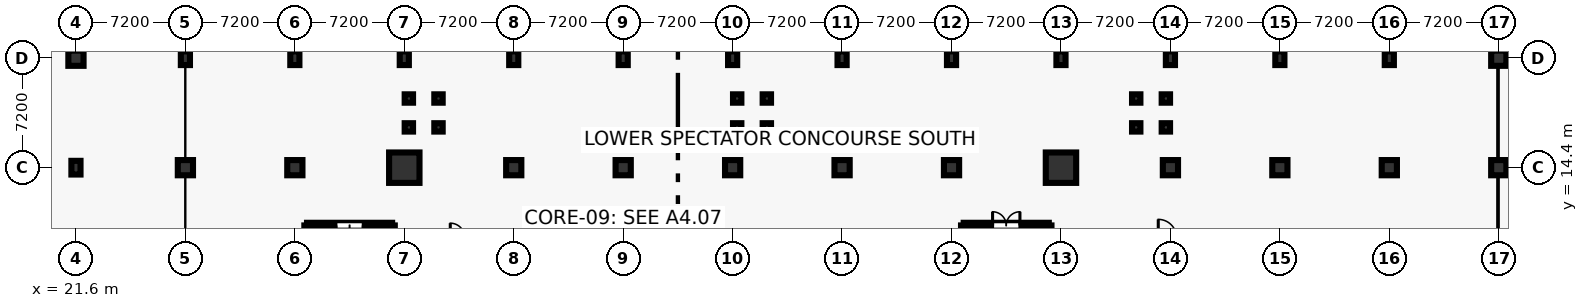
"""IFC4 building model, lengths in metres.
Left out: names, types, materials, properties, quantities, classifications, styles, units other than length and angle.
Written with IfcOpenShell. Run it as: python <this file> out.ifc"""

import sys

from ifc_helpers import new_model, si_unit, direction, frame, frame_2d, origin, origin_2d, place, context, subcontext, project, spatial, rectangle, circle, extrude, element, fill, save


model = new_model("IFC4")
c1 = context("Model", 3, precision=1e-05, world=origin(), true_north=direction((0.0, 1.0)))
c2 = subcontext(c1, "Body", "Model", "MODEL_VIEW")
j1 = project(units=[si_unit("LENGTHUNIT", "METRE"), si_unit("PLANEANGLEUNIT", "RADIAN")], contexts=[c1])
p1 = place(None, origin())
s1 = spatial("IfcSite", under=j1, at=p1, CompositionType="ELEMENT")
p2 = place(p1, origin())
s2 = spatial("IfcBuilding", under=s1, at=p2, CompositionType="ELEMENT")
p3 = place(p2, origin())
s3 = spatial("IfcBuildingStorey", under=s2, at=p3, CompositionType="ELEMENT", Elevation=0.0)
p4 = place(p3, frame((21.6, 14.4, 0.0), z_axis=(0.0, 0.0, 1.0), x_axis=(1.0, 0.0, 0.0)))
e1 = element("IfcColumn", 1, at=p4, inside=s3, PredefinedType="COLUMN", context=c2, shape_type="SweptSolid", body=[
    extrude(rectangle(XDim=0.6, YDim=0.9, at=origin_2d()), origin(), (0.0, 0.0, 1.0), 5.4),
])
p5 = place(p3, frame((21.6, 21.6, 0.0), z_axis=(0.0, 0.0, 1.0), x_axis=(1.0, 0.0, 0.0)))
e2 = element("IfcColumn", 2, at=p5, inside=s3, PredefinedType="COLUMN", context=c2, shape_type="SweptSolid", body=[
    extrude(rectangle(XDim=1.0, YDim=1.0, at=origin_2d()), origin(), (0.0, 0.0, 1.0), 5.4),
])
p6 = place(p3, frame((28.8, 14.4, 0.0), z_axis=(0.0, 0.0, 1.0), x_axis=(1.0, 0.0, 0.0)))
e3 = element("IfcColumn", 3, at=p6, inside=s3, PredefinedType="COLUMN", context=c2, shape_type="SweptSolid", body=[
    extrude(circle(Radius=0.5, at=origin_2d()), origin(), (0.0, 0.0, 1.0), 5.4),
])
p7 = place(p3, frame((28.8, 21.6, 0.0), z_axis=(0.0, 0.0, 1.0), x_axis=(1.0, 0.0, 0.0)))
e4 = element("IfcColumn", 4, at=p7, inside=s3, PredefinedType="COLUMN", context=c2, shape_type="SweptSolid", body=[
    extrude(rectangle(XDim=0.6, YDim=0.9, at=origin_2d()), origin(), (0.0, 0.0, 1.0), 5.4),
])
p8 = place(p3, frame((36.0, 14.4, 0.0), z_axis=(0.0, 0.0, 1.0), x_axis=(1.0, 0.0, 0.0)))
e5 = element("IfcColumn", 5, at=p8, inside=s3, PredefinedType="COLUMN", context=c2, shape_type="SweptSolid", body=[
    extrude(circle(Radius=0.5, at=origin_2d()), origin(), (0.0, 0.0, 1.0), 5.4),
])
p9 = place(p3, frame((36.0, 21.6, 0.0), z_axis=(0.0, 0.0, 1.0), x_axis=(1.0, 0.0, 0.0)))
e6 = element("IfcColumn", 6, at=p9, inside=s3, PredefinedType="COLUMN", context=c2, shape_type="SweptSolid", body=[
    extrude(rectangle(XDim=0.6, YDim=0.9, at=origin_2d()), origin(), (0.0, 0.0, 1.0), 5.4),
])
p10 = place(p3, frame((43.2, 14.4, 0.0), z_axis=(0.0, 0.0, 1.0), x_axis=(1.0, 0.0, 0.0)))
e7 = element("IfcColumn", 7, at=p10, inside=s3, PredefinedType="COLUMN", context=c2, shape_type="SweptSolid", body=[
    extrude(circle(Radius=1.0, at=origin_2d()), origin(), (0.0, 0.0, 1.0), 5.4),
])
p11 = place(p3, frame((43.2, 21.6, 0.0), z_axis=(0.0, 0.0, 1.0), x_axis=(1.0, 0.0, 0.0)))
e8 = element("IfcColumn", 8, at=p11, inside=s3, PredefinedType="COLUMN", context=c2, shape_type="SweptSolid", body=[
    extrude(rectangle(XDim=0.6, YDim=0.9, at=origin_2d()), origin(), (0.0, 0.0, 1.0), 5.4),
])
p12 = place(p3, frame((50.4, 14.4, 0.0), z_axis=(0.0, 0.0, 1.0), x_axis=(1.0, 0.0, 0.0)))
e9 = element("IfcColumn", 9, at=p12, inside=s3, PredefinedType="COLUMN", context=c2, shape_type="SweptSolid", body=[
    extrude(circle(Radius=0.5, at=origin_2d()), origin(), (0.0, 0.0, 1.0), 5.4),
])
p13 = place(p3, frame((50.4, 21.6, 0.0), z_axis=(0.0, 0.0, 1.0), x_axis=(1.0, 0.0, 0.0)))
e10 = element("IfcColumn", 10, at=p13, inside=s3, PredefinedType="COLUMN", context=c2, shape_type="SweptSolid", body=[
    extrude(rectangle(XDim=0.6, YDim=0.9, at=origin_2d()), origin(), (0.0, 0.0, 1.0), 5.4),
])
p14 = place(p3, frame((57.6, 14.4, 0.0), z_axis=(0.0, 0.0, 1.0), x_axis=(1.0, 0.0, 0.0)))
e11 = element("IfcColumn", 11, at=p14, inside=s3, PredefinedType="COLUMN", context=c2, shape_type="SweptSolid", body=[
    extrude(circle(Radius=0.5, at=origin_2d()), origin(), (0.0, 0.0, 1.0), 5.4),
])
p15 = place(p3, frame((57.6, 21.6, 0.0), z_axis=(0.0, 0.0, 1.0), x_axis=(1.0, 0.0, 0.0)))
e12 = element("IfcColumn", 12, at=p15, inside=s3, PredefinedType="COLUMN", context=c2, shape_type="SweptSolid", body=[
    extrude(rectangle(XDim=0.6, YDim=0.9, at=origin_2d()), origin(), (0.0, 0.0, 1.0), 5.4),
])
p16 = place(p3, frame((64.8, 14.4, 0.0), z_axis=(0.0, 0.0, 1.0), x_axis=(1.0, 0.0, 0.0)))
e13 = element("IfcColumn", 13, at=p16, inside=s3, PredefinedType="COLUMN", context=c2, shape_type="SweptSolid", body=[
    extrude(circle(Radius=0.5, at=origin_2d()), origin(), (0.0, 0.0, 1.0), 5.4),
])
p17 = place(p3, frame((64.8, 21.6, 0.0), z_axis=(0.0, 0.0, 1.0), x_axis=(1.0, 0.0, 0.0)))
e14 = element("IfcColumn", 14, at=p17, inside=s3, PredefinedType="COLUMN", context=c2, shape_type="SweptSolid", body=[
    extrude(rectangle(XDim=0.6, YDim=0.9, at=origin_2d()), origin(), (0.0, 0.0, 1.0), 5.4),
])
p18 = place(p3, frame((72.0, 14.4, 0.0), z_axis=(0.0, 0.0, 1.0), x_axis=(1.0, 0.0, 0.0)))
e15 = element("IfcColumn", 15, at=p18, inside=s3, PredefinedType="COLUMN", context=c2, shape_type="SweptSolid", body=[
    extrude(circle(Radius=0.5, at=origin_2d()), origin(), (0.0, 0.0, 1.0), 5.4),
])
p19 = place(p3, frame((72.0, 21.6, 0.0), z_axis=(0.0, 0.0, 1.0), x_axis=(1.0, 0.0, 0.0)))
e16 = element("IfcColumn", 16, at=p19, inside=s3, PredefinedType="COLUMN", context=c2, shape_type="SweptSolid", body=[
    extrude(rectangle(XDim=0.6, YDim=0.9, at=origin_2d()), origin(), (0.0, 0.0, 1.0), 5.4),
])
p20 = place(p3, frame((79.2, 14.4, 0.0), z_axis=(0.0, 0.0, 1.0), x_axis=(1.0, 0.0, 0.0)))
e17 = element("IfcColumn", 17, at=p20, inside=s3, PredefinedType="COLUMN", context=c2, shape_type="SweptSolid", body=[
    extrude(circle(Radius=0.5, at=origin_2d()), origin(), (0.0, 0.0, 1.0), 5.4),
])
p21 = place(p3, frame((79.2, 21.6, 0.0), z_axis=(0.0, 0.0, 1.0), x_axis=(1.0, 0.0, 0.0)))
e18 = element("IfcColumn", 18, at=p21, inside=s3, PredefinedType="COLUMN", context=c2, shape_type="SweptSolid", body=[
    extrude(rectangle(XDim=0.6, YDim=0.9, at=origin_2d()), origin(), (0.0, 0.0, 1.0), 5.4),
])
p22 = place(p3, frame((86.4, 14.4, 0.0), z_axis=(0.0, 0.0, 1.0), x_axis=(1.0, 0.0, 0.0)))
e19 = element("IfcColumn", 19, at=p22, inside=s3, PredefinedType="COLUMN", context=c2, shape_type="SweptSolid", body=[
    extrude(circle(Radius=1.0, at=origin_2d()), origin(), (0.0, 0.0, 1.0), 5.4),
])
p23 = place(p3, frame((86.4, 21.6, 0.0), z_axis=(0.0, 0.0, 1.0), x_axis=(1.0, 0.0, 0.0)))
e20 = element("IfcColumn", 20, at=p23, inside=s3, PredefinedType="COLUMN", context=c2, shape_type="SweptSolid", body=[
    extrude(rectangle(XDim=0.6, YDim=0.9, at=origin_2d()), origin(), (0.0, 0.0, 1.0), 5.4),
])
p24 = place(p3, frame((93.6, 14.4, 0.0), z_axis=(0.0, 0.0, 1.0), x_axis=(1.0, 0.0, 0.0)))
e21 = element("IfcColumn", 21, at=p24, inside=s3, PredefinedType="COLUMN", context=c2, shape_type="SweptSolid", body=[
    extrude(circle(Radius=0.5, at=origin_2d()), origin(), (0.0, 0.0, 1.0), 5.4),
])
p25 = place(p3, frame((93.6, 21.6, 0.0), z_axis=(0.0, 0.0, 1.0), x_axis=(1.0, 0.0, 0.0)))
e22 = element("IfcColumn", 22, at=p25, inside=s3, PredefinedType="COLUMN", context=c2, shape_type="SweptSolid", body=[
    extrude(rectangle(XDim=0.6, YDim=0.9, at=origin_2d()), origin(), (0.0, 0.0, 1.0), 5.4),
])
p26 = place(p3, frame((100.8, 14.4, 0.0), z_axis=(0.0, 0.0, 1.0), x_axis=(1.0, 0.0, 0.0)))
e23 = element("IfcColumn", 23, at=p26, inside=s3, PredefinedType="COLUMN", context=c2, shape_type="SweptSolid", body=[
    extrude(circle(Radius=0.5, at=origin_2d()), origin(), (0.0, 0.0, 1.0), 5.4),
])
p27 = place(p3, frame((100.8, 21.6, 0.0), z_axis=(0.0, 0.0, 1.0), x_axis=(1.0, 0.0, 0.0)))
e24 = element("IfcColumn", 24, at=p27, inside=s3, PredefinedType="COLUMN", context=c2, shape_type="SweptSolid", body=[
    extrude(rectangle(XDim=0.6, YDim=0.9, at=origin_2d()), origin(), (0.0, 0.0, 1.0), 5.4),
])
p28 = place(p3, frame((108.0, 14.4, 0.0), z_axis=(0.0, 0.0, 1.0), x_axis=(1.0, 0.0, 0.0)))
e25 = element("IfcColumn", 25, at=p28, inside=s3, PredefinedType="COLUMN", context=c2, shape_type="SweptSolid", body=[
    extrude(circle(Radius=0.5, at=origin_2d()), origin(), (0.0, 0.0, 1.0), 5.4),
])
p29 = place(p3, frame((108.0, 21.6, 0.0), z_axis=(0.0, 0.0, 1.0), x_axis=(1.0, 0.0, 0.0)))
e26 = element("IfcColumn", 26, at=p29, inside=s3, PredefinedType="COLUMN", context=c2, shape_type="SweptSolid", body=[
    extrude(rectangle(XDim=0.6, YDim=0.9, at=origin_2d()), origin(), (0.0, 0.0, 1.0), 5.4),
])
for number, where, z_axis, x_axis in (
    (27, (115.2, 14.4, 0.0), (0.0, 0.0, 1.0), (1.0, 0.0, 0.0)),
    (28, (115.2, 21.6, 0.0), (0.0, 0.0, 1.0), (1.0, 0.0, 0.0)),
):
    element("IfcColumn", number, at=place(p3, frame(where, z_axis=z_axis, x_axis=x_axis)), inside=s3, PredefinedType="COLUMN", context=c2, shape_type="SweptSolid", body=[
        extrude(circle(Radius=0.5, at=origin_2d()), origin(), (0.0, 0.0, 1.0), 5.4),
    ])
for number, where, z_axis, x_axis in (
    (29, (43.5, 17.05, 0.0), (0.0, 0.0, 1.0), (1.0, 0.0, 0.0)),
    (30, (45.45, 17.05, 0.0), (0.0, 0.0, 1.0), (1.0, 0.0, 0.0)),
    (31, (43.5, 18.95, 0.0), (0.0, 0.0, 1.0), (1.0, 0.0, 0.0)),
    (32, (45.45, 18.95, 0.0), (0.0, 0.0, 1.0), (1.0, 0.0, 0.0)),
    (33, (65.1, 17.05, 0.0), (0.0, 0.0, 1.0), (1.0, 0.0, 0.0)),
    (34, (67.05, 17.05, 0.0), (0.0, 0.0, 1.0), (1.0, 0.0, 0.0)),
    (35, (65.1, 18.95, 0.0), (0.0, 0.0, 1.0), (1.0, 0.0, 0.0)),
    (36, (67.05, 18.95, 0.0), (0.0, 0.0, 1.0), (1.0, 0.0, 0.0)),
    (37, (91.35, 17.05, 0.0), (0.0, 0.0, 1.0), (1.0, 0.0, 0.0)),
    (38, (93.3, 17.05, 0.0), (0.0, 0.0, 1.0), (1.0, 0.0, 0.0)),
    (39, (91.35, 18.95, 0.0), (0.0, 0.0, 1.0), (1.0, 0.0, 0.0)),
    (40, (93.3, 18.95, 0.0), (0.0, 0.0, 1.0), (1.0, 0.0, 0.0)),
):
    element("IfcColumn", number, at=place(p3, frame(where, z_axis=z_axis, x_axis=x_axis)), inside=s3, PredefinedType="COLUMN", context=c2, shape_type="SweptSolid", body=[
        extrude(rectangle(XDim=0.55, YDim=0.55, at=origin_2d()), origin(), (0.0, 0.0, 1.0), 5.4),
    ])
p30 = place(p3, frame((42.4, 6.8, 0.0), z_axis=(0.0, 0.0, 1.0), x_axis=(0.0, 1.0, 0.0)))
e41 = element("IfcWall", 41, at=p30, inside=s3, PredefinedType="SHEAR", context=c2, shape_type="SweptSolid", body=[
    extrude(rectangle(XDim=3.8, YDim=0.35, at=frame_2d((1.9, 0.0))), origin(), (0.0, 0.0, 1.0), 4.1),
])
p31 = place(p3, frame((42.4, 10.6, 0.0), z_axis=(0.0, 0.0, 1.0), x_axis=(-1.0, 0.0, 0.0)))
e42 = element("IfcWall", 42, at=p31, inside=s3, PredefinedType="SHEAR", context=c2, shape_type="SweptSolid", body=[
    extrude(rectangle(XDim=5.6, YDim=0.35, at=frame_2d((2.8, 0.0))), origin(), (0.0, 0.0, 1.0), 4.1),
])
p32 = place(p31, frame((1.9, 0.0, 0.0)))
e43 = element("IfcOpeningElement", 43, at=p32, cuts=e42, PredefinedType="OPENING", context=c2, shape_type="SweptSolid", body=[
    extrude(rectangle(XDim=1.8, YDim=2.3, at=frame_2d((0.9, 1.15))), frame((0.0, 0.185, 0.0), z_axis=(0.0, -1.0, 0.0), x_axis=(1.0, 0.0, 0.0)), (0.0, 0.0, 1.0), 0.37),
])
for number, where, z_axis, x_axis in (
    (44, (36.8, 10.6, 0.0), (0.0, 0.0, 1.0), (0.0, -1.0, 0.0)),
    (45, (85.6, 6.8, 0.0), (0.0, 0.0, 1.0), (0.0, 1.0, 0.0)),
):
    element("IfcWall", number, at=place(p3, frame(where, z_axis=z_axis, x_axis=x_axis)), inside=s3, PredefinedType="SHEAR", context=c2, shape_type="SweptSolid", body=[
        extrude(rectangle(XDim=3.8, YDim=0.35, at=frame_2d((1.9, 0.0))), origin(), (0.0, 0.0, 1.0), 4.1),
    ])
p33 = place(p3, frame((85.6, 10.6, 0.0), z_axis=(0.0, 0.0, 1.0), x_axis=(-1.0, 0.0, 0.0)))
e46 = element("IfcWall", 46, at=p33, inside=s3, PredefinedType="SHEAR", context=c2, shape_type="SweptSolid", body=[
    extrude(rectangle(XDim=5.6, YDim=0.35, at=frame_2d((2.8, 0.0))), origin(), (0.0, 0.0, 1.0), 4.1),
])
p34 = place(p33, frame((1.9, 0.0, 0.0)))
e47 = element("IfcOpeningElement", 47, at=p34, cuts=e46, PredefinedType="OPENING", context=c2, shape_type="SweptSolid", body=[
    extrude(rectangle(XDim=1.8, YDim=2.3, at=frame_2d((0.9, 1.15))), frame((0.0, 0.185, 0.0), z_axis=(0.0, -1.0, 0.0), x_axis=(1.0, 0.0, 0.0)), (0.0, 0.0, 1.0), 0.37),
])
p35 = place(p3, frame((80.0, 10.6, 0.0), z_axis=(0.0, 0.0, 1.0), x_axis=(0.0, -1.0, 0.0)))
e48 = element("IfcWall", 48, at=p35, inside=s3, PredefinedType="SHEAR", context=c2, shape_type="SweptSolid", body=[
    extrude(rectangle(XDim=3.8, YDim=0.35, at=frame_2d((1.9, 0.0))), origin(), (0.0, 0.0, 1.0), 4.1),
])
p36 = place(p32, origin())
e49 = element("IfcDoor", 49, at=p36, inside=s3, OperationType="DOUBLE_DOOR_SINGLE_SWING", PredefinedType="DOOR", context=c2, shape_type="SweptSolid", body=[
    extrude(rectangle(XDim=1.8, YDim=2.3, at=frame_2d((0.9, 1.15))), frame((0.0, 0.025, 0.0), z_axis=(0.0, -1.0, 0.0), x_axis=(1.0, 0.0, 0.0)), (0.0, 0.0, 1.0), 0.05),
])
fill(e43, e49)
p37 = place(p34, frame((1.8, 0.0, 0.0), z_axis=(0.0, 0.0, 1.0), x_axis=(-1.0, 0.0, 0.0)))
e50 = element("IfcDoor", 50, at=p37, inside=s3, OperationType="DOUBLE_DOOR_SINGLE_SWING", PredefinedType="DOOR", context=c2, shape_type="SweptSolid", body=[
    extrude(rectangle(XDim=1.8, YDim=2.3, at=frame_2d((0.9, 1.15))), frame((0.0, 0.025, 0.0), z_axis=(0.0, -1.0, 0.0), x_axis=(1.0, 0.0, 0.0)), (0.0, 0.0, 1.0), 0.05),
])
fill(e47, e50)
save(model, sys.argv[1])
